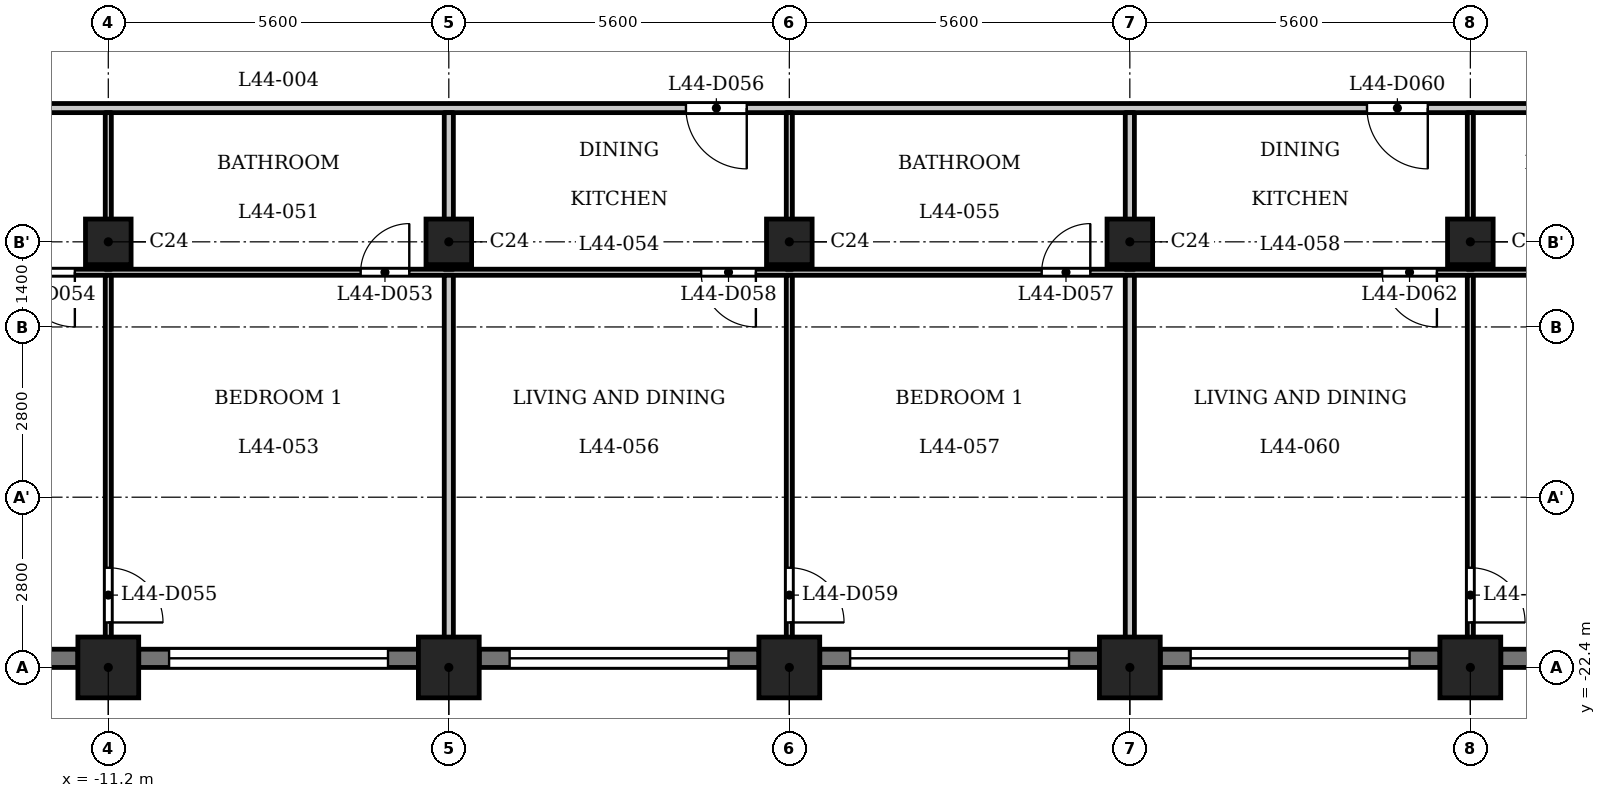
"""IFC4 building model, lengths in metres.
Left out: names, types, materials, properties, quantities, classifications, styles, units other than length and angle.
Written with IfcOpenShell. Run it as: python <this file> out.ifc"""

import sys

from ifc_helpers import new_model, si_unit, direction, frame, frame_2d, origin, origin_2d, place, context, subcontext, project, spatial, rectangle, extrude, element, fill, save


model = new_model("IFC4")
c1 = context("Model", 3, precision=1e-05, world=origin(), true_north=direction((0.0, 1.0)))
c2 = subcontext(c1, "Body", "Model", "MODEL_VIEW")
j1 = project(units=[si_unit("LENGTHUNIT", "METRE"), si_unit("PLANEANGLEUNIT", "RADIAN")], contexts=[c1])
p1 = place(None, origin())
s1 = spatial("IfcSite", under=j1, at=p1, CompositionType="ELEMENT")
p2 = place(p1, origin())
s2 = spatial("IfcBuilding", under=s1, at=p2, CompositionType="ELEMENT")
p3 = place(p2, frame((0.0, 0.0, 171.1)))
s3 = spatial("IfcBuildingStorey", under=s2, at=p3, CompositionType="ELEMENT", Elevation=171.1)
for number, where, z_axis, x_axis in (
    (1, (-11.2, -22.4, 0.0), (0.0, 0.0, 1.0), (1.0, 0.0, 0.0)),
    (2, (-5.6, -22.4, 0.0), (0.0, 0.0, 1.0), (1.0, 0.0, 0.0)),
    (3, (0.0, -22.4, 0.0), (0.0, 0.0, 1.0), (1.0, 0.0, 0.0)),
    (4, (5.6, -22.4, 0.0), (0.0, 0.0, 1.0), (1.0, 0.0, 0.0)),
    (5, (11.2, -22.4, 0.0), (0.0, 0.0, 1.0), (1.0, 0.0, 0.0)),
):
    element("IfcColumn", number, at=place(p3, frame(where, z_axis=z_axis, x_axis=x_axis)), inside=s3, PredefinedType="COLUMN", context=c2, shape_type="SweptSolid", body=[
        extrude(rectangle(XDim=1.0, YDim=1.0, at=origin_2d()), origin(), (0.0, 0.0, 1.0), 3.5),
    ])
for number, where, z_axis, x_axis in (
    (6, (-11.2, -15.4, 0.0), (0.0, 0.0, 1.0), (1.0, 0.0, 0.0)),
    (7, (-5.6, -15.4, 0.0), (0.0, 0.0, 1.0), (1.0, 0.0, 0.0)),
    (8, (0.0, -15.4, 0.0), (0.0, 0.0, 1.0), (1.0, 0.0, 0.0)),
    (9, (5.6, -15.4, 0.0), (0.0, 0.0, 1.0), (1.0, 0.0, 0.0)),
    (10, (11.2, -15.4, 0.0), (0.0, 0.0, 1.0), (1.0, 0.0, 0.0)),
):
    element("IfcColumn", number, at=place(p3, frame(where, z_axis=z_axis, x_axis=x_axis)), inside=s3, PredefinedType="COLUMN", context=c2, shape_type="SweptSolid", body=[
        extrude(rectangle(XDim=0.75, YDim=0.75, at=origin_2d()), origin(), (0.0, 0.0, 1.0), 3.5),
    ])
p4 = place(p3, frame((-16.3, -22.25, 0.0), z_axis=(0.0, 0.0, 1.0), x_axis=(1.0, 0.0, 0.0)))
e11 = element("IfcWall", 11, at=p4, inside=s3, PredefinedType="SOLIDWALL", context=c2, shape_type="SweptSolid", body=[
    extrude(rectangle(XDim=4.6, YDim=0.3, at=frame_2d((2.3, 0.0))), origin(), (0.0, 0.0, 1.0), 2.45),
])
p5 = place(p4, frame((0.5, 0.0, 1.2)))
e12 = element("IfcOpeningElement", 12, at=p5, cuts=e11, PredefinedType="OPENING", context=c2, shape_type="SweptSolid", body=[
    extrude(rectangle(XDim=3.6, YDim=0.95, at=frame_2d((1.8, 0.475))), frame((0.0, 0.16, 0.0), z_axis=(0.0, -1.0, 0.0), x_axis=(1.0, 0.0, 0.0)), (0.0, 0.0, 1.0), 0.32),
])
p6 = place(p3, frame((-10.7, -22.25, 0.0), z_axis=(0.0, 0.0, 1.0), x_axis=(1.0, 0.0, 0.0)))
e13 = element("IfcWall", 13, at=p6, inside=s3, PredefinedType="SOLIDWALL", context=c2, shape_type="SweptSolid", body=[
    extrude(rectangle(XDim=4.6, YDim=0.3, at=frame_2d((2.3, 0.0))), origin(), (0.0, 0.0, 1.0), 2.45),
])
p7 = place(p6, frame((0.5, 0.0, 1.2)))
e14 = element("IfcOpeningElement", 14, at=p7, cuts=e13, PredefinedType="OPENING", context=c2, shape_type="SweptSolid", body=[
    extrude(rectangle(XDim=3.6, YDim=0.95, at=frame_2d((1.8, 0.475))), frame((0.0, 0.16, 0.0), z_axis=(0.0, -1.0, 0.0), x_axis=(1.0, 0.0, 0.0)), (0.0, 0.0, 1.0), 0.32),
])
p8 = place(p3, frame((-5.1, -22.25, 0.0), z_axis=(0.0, 0.0, 1.0), x_axis=(1.0, 0.0, 0.0)))
e15 = element("IfcWall", 15, at=p8, inside=s3, PredefinedType="SOLIDWALL", context=c2, shape_type="SweptSolid", body=[
    extrude(rectangle(XDim=4.6, YDim=0.3, at=frame_2d((2.3, 0.0))), origin(), (0.0, 0.0, 1.0), 2.45),
])
p9 = place(p8, frame((0.5, 0.0, 1.2)))
e16 = element("IfcOpeningElement", 16, at=p9, cuts=e15, PredefinedType="OPENING", context=c2, shape_type="SweptSolid", body=[
    extrude(rectangle(XDim=3.6, YDim=0.95, at=frame_2d((1.8, 0.475))), frame((0.0, 0.16, 0.0), z_axis=(0.0, -1.0, 0.0), x_axis=(1.0, 0.0, 0.0)), (0.0, 0.0, 1.0), 0.32),
])
p10 = place(p3, frame((0.5, -22.25, 0.0), z_axis=(0.0, 0.0, 1.0), x_axis=(1.0, 0.0, 0.0)))
e17 = element("IfcWall", 17, at=p10, inside=s3, PredefinedType="SOLIDWALL", context=c2, shape_type="SweptSolid", body=[
    extrude(rectangle(XDim=4.6, YDim=0.3, at=frame_2d((2.3, 0.0))), origin(), (0.0, 0.0, 1.0), 2.45),
])
p11 = place(p10, frame((0.5, 0.0, 1.2)))
e18 = element("IfcOpeningElement", 18, at=p11, cuts=e17, PredefinedType="OPENING", context=c2, shape_type="SweptSolid", body=[
    extrude(rectangle(XDim=3.6, YDim=0.95, at=frame_2d((1.8, 0.475))), frame((0.0, 0.16, 0.0), z_axis=(0.0, -1.0, 0.0), x_axis=(1.0, 0.0, 0.0)), (0.0, 0.0, 1.0), 0.32),
])
p12 = place(p3, frame((6.1, -22.25, 0.0), z_axis=(0.0, 0.0, 1.0), x_axis=(1.0, 0.0, 0.0)))
e19 = element("IfcWall", 19, at=p12, inside=s3, PredefinedType="SOLIDWALL", context=c2, shape_type="SweptSolid", body=[
    extrude(rectangle(XDim=4.6, YDim=0.3, at=frame_2d((2.3, 0.0))), origin(), (0.0, 0.0, 1.0), 2.45),
])
p13 = place(p12, frame((0.5, 0.0, 1.2)))
e20 = element("IfcOpeningElement", 20, at=p13, cuts=e19, PredefinedType="OPENING", context=c2, shape_type="SweptSolid", body=[
    extrude(rectangle(XDim=3.6, YDim=0.95, at=frame_2d((1.8, 0.475))), frame((0.0, 0.16, 0.0), z_axis=(0.0, -1.0, 0.0), x_axis=(1.0, 0.0, 0.0)), (0.0, 0.0, 1.0), 0.32),
])
p14 = place(p3, frame((11.7, -22.25, 0.0), z_axis=(0.0, 0.0, 1.0), x_axis=(1.0, 0.0, 0.0)))
e21 = element("IfcWall", 21, at=p14, inside=s3, PredefinedType="SOLIDWALL", context=c2, shape_type="SweptSolid", body=[
    extrude(rectangle(XDim=4.6, YDim=0.3, at=frame_2d((2.3, 0.0))), origin(), (0.0, 0.0, 1.0), 2.45),
])
p15 = place(p14, frame((0.5, 0.0, 1.2)))
e22 = element("IfcOpeningElement", 22, at=p15, cuts=e21, PredefinedType="OPENING", context=c2, shape_type="SweptSolid", body=[
    extrude(rectangle(XDim=3.6, YDim=0.95, at=frame_2d((1.8, 0.475))), frame((0.0, 0.16, 0.0), z_axis=(0.0, -1.0, 0.0), x_axis=(1.0, 0.0, 0.0)), (0.0, 0.0, 1.0), 0.32),
])
p16 = place(p3, frame((-16.725, -15.9, 0.0), z_axis=(0.0, 0.0, 1.0), x_axis=(1.0, 0.0, 0.0)))
e23 = element("IfcWall", 23, at=p16, inside=s3, PredefinedType="PARTITIONING", context=c2, shape_type="SweptSolid", body=[
    extrude(rectangle(XDim=33.45, YDim=0.1, at=frame_2d((16.725, 0.0))), origin(), (0.0, 0.0, 1.0), 3.2),
])
p17 = place(p16, frame((9.675, 0.0, 0.0)))
e24 = element("IfcOpeningElement", 24, at=p17, cuts=e23, PredefinedType="OPENING", context=c2, shape_type="SweptSolid", body=[
    extrude(rectangle(XDim=0.8, YDim=2.1, at=frame_2d((0.4, 1.05))), frame((0.0, 0.06, 0.0), z_axis=(0.0, -1.0, 0.0), x_axis=(1.0, 0.0, 0.0)), (0.0, 0.0, 1.0), 0.12),
])
p18 = place(p16, frame((4.075, 0.0, 0.0)))
e25 = element("IfcOpeningElement", 25, at=p18, cuts=e23, PredefinedType="OPENING", context=c2, shape_type="SweptSolid", body=[
    extrude(rectangle(XDim=0.9, YDim=2.1, at=frame_2d((0.45, 1.05))), frame((0.0, 0.06, 0.0), z_axis=(0.0, -1.0, 0.0), x_axis=(1.0, 0.0, 0.0)), (0.0, 0.0, 1.0), 0.12),
])
p19 = place(p16, frame((20.875, 0.0, 0.0)))
e26 = element("IfcOpeningElement", 26, at=p19, cuts=e23, PredefinedType="OPENING", context=c2, shape_type="SweptSolid", body=[
    extrude(rectangle(XDim=0.8, YDim=2.1, at=frame_2d((0.4, 1.05))), frame((0.0, 0.06, 0.0), z_axis=(0.0, -1.0, 0.0), x_axis=(1.0, 0.0, 0.0)), (0.0, 0.0, 1.0), 0.12),
])
p20 = place(p16, frame((15.275, 0.0, 0.0)))
e27 = element("IfcOpeningElement", 27, at=p20, cuts=e23, PredefinedType="OPENING", context=c2, shape_type="SweptSolid", body=[
    extrude(rectangle(XDim=0.9, YDim=2.1, at=frame_2d((0.45, 1.05))), frame((0.0, 0.06, 0.0), z_axis=(0.0, -1.0, 0.0), x_axis=(1.0, 0.0, 0.0)), (0.0, 0.0, 1.0), 0.12),
])
p21 = place(p16, frame((30.825, 0.0, 0.0)))
e28 = element("IfcOpeningElement", 28, at=p21, cuts=e23, PredefinedType="OPENING", context=c2, shape_type="SweptSolid", body=[
    extrude(rectangle(XDim=0.8, YDim=2.1, at=frame_2d((0.4, 1.05))), frame((0.0, 0.06, 0.0), z_axis=(0.0, -1.0, 0.0), x_axis=(1.0, 0.0, 0.0)), (0.0, 0.0, 1.0), 0.12),
])
p22 = place(p16, frame((26.475, 0.0, 0.0)))
e29 = element("IfcOpeningElement", 29, at=p22, cuts=e23, PredefinedType="OPENING", context=c2, shape_type="SweptSolid", body=[
    extrude(rectangle(XDim=0.9, YDim=2.1, at=frame_2d((0.45, 1.05))), frame((0.0, 0.06, 0.0), z_axis=(0.0, -1.0, 0.0), x_axis=(1.0, 0.0, 0.0)), (0.0, 0.0, 1.0), 0.12),
])
p23 = place(p3, frame((-17.4, -13.2, 0.0), z_axis=(0.0, 0.0, 1.0), x_axis=(1.0, 0.0, 0.0)))
e30 = element("IfcWall", 30, at=p23, inside=s3, PredefinedType="PARTITIONING", context=c2, shape_type="SweptSolid", body=[
    extrude(rectangle(XDim=34.8, YDim=0.15, at=frame_2d((17.4, 0.0))), origin(), (0.0, 0.0, 1.0), 3.2),
])
p24 = place(p23, frame((0.15, 0.0, 0.0)))
e31 = element("IfcOpeningElement", 31, at=p24, cuts=e30, PredefinedType="OPENING", context=c2, shape_type="SweptSolid", body=[
    extrude(rectangle(XDim=1.0, YDim=2.1, at=frame_2d((0.5, 1.05))), frame((0.0, 0.085, 0.0), z_axis=(0.0, -1.0, 0.0), x_axis=(1.0, 0.0, 0.0)), (0.0, 0.0, 1.0), 0.17),
])
p25 = place(p23, frame((33.55, 0.0, 0.0)))
e32 = element("IfcOpeningElement", 32, at=p25, cuts=e30, PredefinedType="OPENING", context=c2, shape_type="SweptSolid", body=[
    extrude(rectangle(XDim=1.0, YDim=2.1, at=frame_2d((0.5, 1.05))), frame((0.0, 0.085, 0.0), z_axis=(0.0, -1.0, 0.0), x_axis=(1.0, 0.0, 0.0)), (0.0, 0.0, 1.0), 0.17),
])
p26 = place(p23, frame((15.7, 0.0, 0.0)))
e33 = element("IfcOpeningElement", 33, at=p26, cuts=e30, PredefinedType="OPENING", context=c2, shape_type="SweptSolid", body=[
    extrude(rectangle(XDim=1.0, YDim=2.1, at=frame_2d((0.5, 1.05))), frame((0.0, 0.085, 0.0), z_axis=(0.0, -1.0, 0.0), x_axis=(1.0, 0.0, 0.0)), (0.0, 0.0, 1.0), 0.17),
])
p27 = place(p23, frame((26.9, 0.0, 0.0)))
e34 = element("IfcOpeningElement", 34, at=p27, cuts=e30, PredefinedType="OPENING", context=c2, shape_type="SweptSolid", body=[
    extrude(rectangle(XDim=1.0, YDim=2.1, at=frame_2d((0.5, 1.05))), frame((0.0, 0.085, 0.0), z_axis=(0.0, -1.0, 0.0), x_axis=(1.0, 0.0, 0.0)), (0.0, 0.0, 1.0), 0.17),
])
p28 = place(p3, frame((-11.2, -22.88, 0.0), z_axis=(0.0, 0.0, 1.0), x_axis=(0.0, 1.0, 0.0)))
e35 = element("IfcWall", 35, at=p28, inside=s3, PredefinedType="PARTITIONING", context=c2, shape_type="SweptSolid", body=[
    extrude(rectangle(XDim=6.93, YDim=0.1, at=frame_2d((3.465, 0.0))), origin(), (0.0, 0.0, 1.0), 3.2),
])
p29 = place(p28, frame((1.22, 0.0, 0.0)))
e36 = element("IfcOpeningElement", 36, at=p29, cuts=e35, PredefinedType="OPENING", context=c2, shape_type="SweptSolid", body=[
    extrude(rectangle(XDim=0.9, YDim=2.1, at=frame_2d((0.45, 1.05))), frame((0.0, 0.06, 0.0), z_axis=(0.0, -1.0, 0.0), x_axis=(1.0, 0.0, 0.0)), (0.0, 0.0, 1.0), 0.12),
])
p30 = place(p3, frame((-11.2, -15.85, 0.0), z_axis=(0.0, 0.0, 1.0), x_axis=(0.0, 1.0, 0.0)))
e37 = element("IfcWall", 37, at=p30, inside=s3, PredefinedType="PARTITIONING", context=c2, shape_type="SweptSolid", body=[
    extrude(rectangle(XDim=2.575, YDim=0.1, at=frame_2d((1.288, 0.0))), origin(), (0.0, 0.0, 1.0), 3.2),
])
p31 = place(p3, frame((-5.6, -22.88, 0.0), z_axis=(0.0, 0.0, 1.0), x_axis=(0.0, 1.0, 0.0)))
e38 = element("IfcWall", 38, at=p31, inside=s3, PredefinedType="PARTITIONING", context=c2, shape_type="SweptSolid", body=[
    extrude(rectangle(XDim=6.93, YDim=0.15, at=frame_2d((3.465, 0.0))), origin(), (0.0, 0.0, 1.0), 3.2),
])
p32 = place(p3, frame((-5.6, -15.85, 0.0), z_axis=(0.0, 0.0, 1.0), x_axis=(0.0, 1.0, 0.0)))
e39 = element("IfcWall", 39, at=p32, inside=s3, PredefinedType="PARTITIONING", context=c2, shape_type="SweptSolid", body=[
    extrude(rectangle(XDim=2.575, YDim=0.15, at=frame_2d((1.288, 0.0))), origin(), (0.0, 0.0, 1.0), 3.2),
])
p33 = place(p3, frame((0.0, -22.88, 0.0), z_axis=(0.0, 0.0, 1.0), x_axis=(0.0, 1.0, 0.0)))
e40 = element("IfcWall", 40, at=p33, inside=s3, PredefinedType="PARTITIONING", context=c2, shape_type="SweptSolid", body=[
    extrude(rectangle(XDim=6.93, YDim=0.1, at=frame_2d((3.465, 0.0))), origin(), (0.0, 0.0, 1.0), 3.2),
])
p34 = place(p33, frame((1.22, 0.0, 0.0)))
e41 = element("IfcOpeningElement", 41, at=p34, cuts=e40, PredefinedType="OPENING", context=c2, shape_type="SweptSolid", body=[
    extrude(rectangle(XDim=0.9, YDim=2.1, at=frame_2d((0.45, 1.05))), frame((0.0, 0.06, 0.0), z_axis=(0.0, -1.0, 0.0), x_axis=(1.0, 0.0, 0.0)), (0.0, 0.0, 1.0), 0.12),
])
p35 = place(p3, frame((0.0, -15.85, 0.0), z_axis=(0.0, 0.0, 1.0), x_axis=(0.0, 1.0, 0.0)))
e42 = element("IfcWall", 42, at=p35, inside=s3, PredefinedType="PARTITIONING", context=c2, shape_type="SweptSolid", body=[
    extrude(rectangle(XDim=2.575, YDim=0.1, at=frame_2d((1.288, 0.0))), origin(), (0.0, 0.0, 1.0), 3.2),
])
p36 = place(p3, frame((5.6, -22.88, 0.0), z_axis=(0.0, 0.0, 1.0), x_axis=(0.0, 1.0, 0.0)))
e43 = element("IfcWall", 43, at=p36, inside=s3, PredefinedType="PARTITIONING", context=c2, shape_type="SweptSolid", body=[
    extrude(rectangle(XDim=6.93, YDim=0.15, at=frame_2d((3.465, 0.0))), origin(), (0.0, 0.0, 1.0), 3.2),
])
p37 = place(p3, frame((5.6, -15.85, 0.0), z_axis=(0.0, 0.0, 1.0), x_axis=(0.0, 1.0, 0.0)))
e44 = element("IfcWall", 44, at=p37, inside=s3, PredefinedType="PARTITIONING", context=c2, shape_type="SweptSolid", body=[
    extrude(rectangle(XDim=2.575, YDim=0.15, at=frame_2d((1.288, 0.0))), origin(), (0.0, 0.0, 1.0), 3.2),
])
p38 = place(p3, frame((11.2, -22.88, 0.0), z_axis=(0.0, 0.0, 1.0), x_axis=(0.0, 1.0, 0.0)))
e45 = element("IfcWall", 45, at=p38, inside=s3, PredefinedType="PARTITIONING", context=c2, shape_type="SweptSolid", body=[
    extrude(rectangle(XDim=6.93, YDim=0.1, at=frame_2d((3.465, 0.0))), origin(), (0.0, 0.0, 1.0), 3.2),
])
p39 = place(p38, frame((1.22, 0.0, 0.0)))
e46 = element("IfcOpeningElement", 46, at=p39, cuts=e45, PredefinedType="OPENING", context=c2, shape_type="SweptSolid", body=[
    extrude(rectangle(XDim=0.9, YDim=2.1, at=frame_2d((0.45, 1.05))), frame((0.0, 0.06, 0.0), z_axis=(0.0, -1.0, 0.0), x_axis=(1.0, 0.0, 0.0)), (0.0, 0.0, 1.0), 0.12),
])
p40 = place(p3, frame((11.2, -15.85, 0.0), z_axis=(0.0, 0.0, 1.0), x_axis=(0.0, 1.0, 0.0)))
e47 = element("IfcWall", 47, at=p40, inside=s3, PredefinedType="PARTITIONING", context=c2, shape_type="SweptSolid", body=[
    extrude(rectangle(XDim=2.575, YDim=0.1, at=frame_2d((1.288, 0.0))), origin(), (0.0, 0.0, 1.0), 3.2),
])
p41 = place(p17, origin())
e48 = element("IfcDoor", 48, at=p41, inside=s3, OperationType="SINGLE_SWING_LEFT", PredefinedType="DOOR", context=c2, shape_type="SweptSolid", body=[
    extrude(rectangle(XDim=0.8, YDim=2.1, at=frame_2d((0.4, 1.05))), frame((0.0, 0.025, 0.0), z_axis=(0.0, -1.0, 0.0), x_axis=(1.0, 0.0, 0.0)), (0.0, 0.0, 1.0), 0.05),
])
fill(e24, e48)
p42 = place(p18, origin())
e49 = element("IfcDoor", 49, at=p42, inside=s3, OperationType="SINGLE_SWING_RIGHT", PredefinedType="DOOR", context=c2, shape_type="SweptSolid", body=[
    extrude(rectangle(XDim=0.9, YDim=2.1, at=frame_2d((0.45, 1.05))), frame((0.0, 0.025, 0.0), z_axis=(0.0, -1.0, 0.0), x_axis=(1.0, 0.0, 0.0)), (0.0, 0.0, 1.0), 0.05),
])
fill(e25, e49)
p43 = place(p29, origin())
e50 = element("IfcDoor", 50, at=p43, inside=s3, OperationType="SINGLE_SWING_LEFT", PredefinedType="DOOR", context=c2, shape_type="SweptSolid", body=[
    extrude(rectangle(XDim=0.9, YDim=2.1, at=frame_2d((0.45, 1.05))), frame((0.0, 0.025, 0.0), z_axis=(0.0, -1.0, 0.0), x_axis=(1.0, 0.0, 0.0)), (0.0, 0.0, 1.0), 0.05),
])
fill(e36, e50)
p44 = place(p26, origin())
e51 = element("IfcDoor", 51, at=p44, inside=s3, OperationType="SINGLE_SWING_RIGHT", PredefinedType="DOOR", context=c2, shape_type="SweptSolid", body=[
    extrude(rectangle(XDim=1.0, YDim=2.1, at=frame_2d((0.5, 1.05))), frame((0.0, 0.025, 0.0), z_axis=(0.0, -1.0, 0.0), x_axis=(1.0, 0.0, 0.0)), (0.0, 0.0, 1.0), 0.05),
])
fill(e33, e51)
p45 = place(p19, origin())
e52 = element("IfcDoor", 52, at=p45, inside=s3, OperationType="SINGLE_SWING_LEFT", PredefinedType="DOOR", context=c2, shape_type="SweptSolid", body=[
    extrude(rectangle(XDim=0.8, YDim=2.1, at=frame_2d((0.4, 1.05))), frame((0.0, 0.025, 0.0), z_axis=(0.0, -1.0, 0.0), x_axis=(1.0, 0.0, 0.0)), (0.0, 0.0, 1.0), 0.05),
])
fill(e26, e52)
p46 = place(p20, origin())
e53 = element("IfcDoor", 53, at=p46, inside=s3, OperationType="SINGLE_SWING_RIGHT", PredefinedType="DOOR", context=c2, shape_type="SweptSolid", body=[
    extrude(rectangle(XDim=0.9, YDim=2.1, at=frame_2d((0.45, 1.05))), frame((0.0, 0.025, 0.0), z_axis=(0.0, -1.0, 0.0), x_axis=(1.0, 0.0, 0.0)), (0.0, 0.0, 1.0), 0.05),
])
fill(e27, e53)
p47 = place(p34, origin())
e54 = element("IfcDoor", 54, at=p47, inside=s3, OperationType="SINGLE_SWING_LEFT", PredefinedType="DOOR", context=c2, shape_type="SweptSolid", body=[
    extrude(rectangle(XDim=0.9, YDim=2.1, at=frame_2d((0.45, 1.05))), frame((0.0, 0.025, 0.0), z_axis=(0.0, -1.0, 0.0), x_axis=(1.0, 0.0, 0.0)), (0.0, 0.0, 1.0), 0.05),
])
fill(e41, e54)
p48 = place(p27, origin())
e55 = element("IfcDoor", 55, at=p48, inside=s3, OperationType="SINGLE_SWING_RIGHT", PredefinedType="DOOR", context=c2, shape_type="SweptSolid", body=[
    extrude(rectangle(XDim=1.0, YDim=2.1, at=frame_2d((0.5, 1.05))), frame((0.0, 0.025, 0.0), z_axis=(0.0, -1.0, 0.0), x_axis=(1.0, 0.0, 0.0)), (0.0, 0.0, 1.0), 0.05),
])
fill(e34, e55)
p49 = place(p22, origin())
e56 = element("IfcDoor", 56, at=p49, inside=s3, OperationType="SINGLE_SWING_RIGHT", PredefinedType="DOOR", context=c2, shape_type="SweptSolid", body=[
    extrude(rectangle(XDim=0.9, YDim=2.1, at=frame_2d((0.45, 1.05))), frame((0.0, 0.025, 0.0), z_axis=(0.0, -1.0, 0.0), x_axis=(1.0, 0.0, 0.0)), (0.0, 0.0, 1.0), 0.05),
])
fill(e29, e56)
p50 = place(p39, origin())
e57 = element("IfcDoor", 57, at=p50, inside=s3, OperationType="SINGLE_SWING_LEFT", PredefinedType="DOOR", context=c2, shape_type="SweptSolid", body=[
    extrude(rectangle(XDim=0.9, YDim=2.1, at=frame_2d((0.45, 1.05))), frame((0.0, 0.025, 0.0), z_axis=(0.0, -1.0, 0.0), x_axis=(1.0, 0.0, 0.0)), (0.0, 0.0, 1.0), 0.05),
])
fill(e46, e57)
p51 = place(p7, origin())
e58 = element("IfcWindow", 58, at=p51, inside=s3, PartitioningType="SINGLE_PANEL", PredefinedType="WINDOW", context=c2, shape_type="SweptSolid", body=[
    extrude(rectangle(XDim=3.6, YDim=0.95, at=frame_2d((1.8, 0.475))), frame((0.0, 0.03, 0.0), z_axis=(0.0, -1.0, 0.0), x_axis=(1.0, 0.0, 0.0)), (0.0, 0.0, 1.0), 0.06),
])
fill(e14, e58)
p52 = place(p9, origin())
e59 = element("IfcWindow", 59, at=p52, inside=s3, PartitioningType="SINGLE_PANEL", PredefinedType="WINDOW", context=c2, shape_type="SweptSolid", body=[
    extrude(rectangle(XDim=3.6, YDim=0.95, at=frame_2d((1.8, 0.475))), frame((0.0, 0.03, 0.0), z_axis=(0.0, -1.0, 0.0), x_axis=(1.0, 0.0, 0.0)), (0.0, 0.0, 1.0), 0.06),
])
fill(e16, e59)
p53 = place(p11, origin())
e60 = element("IfcWindow", 60, at=p53, inside=s3, PartitioningType="SINGLE_PANEL", PredefinedType="WINDOW", context=c2, shape_type="SweptSolid", body=[
    extrude(rectangle(XDim=3.6, YDim=0.95, at=frame_2d((1.8, 0.475))), frame((0.0, 0.03, 0.0), z_axis=(0.0, -1.0, 0.0), x_axis=(1.0, 0.0, 0.0)), (0.0, 0.0, 1.0), 0.06),
])
fill(e18, e60)
p54 = place(p13, origin())
e61 = element("IfcWindow", 61, at=p54, inside=s3, PartitioningType="SINGLE_PANEL", PredefinedType="WINDOW", context=c2, shape_type="SweptSolid", body=[
    extrude(rectangle(XDim=3.6, YDim=0.95, at=frame_2d((1.8, 0.475))), frame((0.0, 0.03, 0.0), z_axis=(0.0, -1.0, 0.0), x_axis=(1.0, 0.0, 0.0)), (0.0, 0.0, 1.0), 0.06),
])
fill(e20, e61)
save(model, sys.argv[1])
